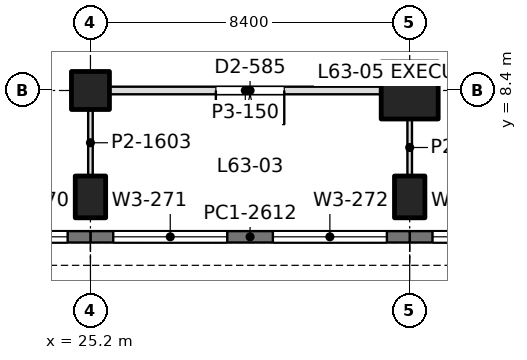
"""IFC4 building model, lengths in metres.
Left out: names, types, materials, properties, quantities, classifications, styles, units other than length and angle.
Written with IfcOpenShell. Run it as: python <this file> out.ifc"""

import sys

from ifc_helpers import new_model, si_unit, direction, frame, frame_2d, origin, origin_2d, place, context, subcontext, project, spatial, rectangle, extrude, element, fill, save


model = new_model("IFC4")
c1 = context("Model", 3, precision=1e-05, world=origin(), true_north=direction((0.0, 1.0)))
c2 = subcontext(c1, "Body", "Model", "MODEL_VIEW")
j1 = project(units=[si_unit("LENGTHUNIT", "METRE"), si_unit("PLANEANGLEUNIT", "RADIAN")], contexts=[c1])
p1 = place(None, origin())
s1 = spatial("IfcSite", under=j1, at=p1, CompositionType="ELEMENT")
p2 = place(p1, origin())
s2 = spatial("IfcBuilding", under=s1, at=p2, CompositionType="ELEMENT")
p3 = place(p2, frame((0.0, 0.0, 277.2)))
s3 = spatial("IfcBuildingStorey", under=s2, at=p3, CompositionType="ELEMENT", Elevation=277.2)
p4 = place(p3, frame((25.2, 5.6, 0.0), z_axis=(0.0, 0.0, 1.0), x_axis=(1.0, 0.0, 0.0)))
e1 = element("IfcColumn", 1, at=p4, inside=s3, PredefinedType="COLUMN", context=c2, shape_type="SweptSolid", body=[
    extrude(rectangle(XDim=0.8, YDim=1.1, at=origin_2d()), origin(), (0.0, 0.0, 1.0), 4.5),
])
p5 = place(p3, frame((25.2, 8.4, 0.0), z_axis=(0.0, 0.0, 1.0), x_axis=(1.0, 0.0, 0.0)))
e2 = element("IfcColumn", 2, at=p5, inside=s3, PredefinedType="COLUMN", context=c2, shape_type="SweptSolid", body=[
    extrude(rectangle(XDim=1.0, YDim=1.0, at=origin_2d()), origin(), (0.0, 0.0, 1.0), 4.5),
])
p6 = place(p3, frame((33.6, 5.6, 0.0), z_axis=(0.0, 0.0, 1.0), x_axis=(1.0, 0.0, 0.0)))
e3 = element("IfcColumn", 3, at=p6, inside=s3, PredefinedType="COLUMN", context=c2, shape_type="SweptSolid", body=[
    extrude(rectangle(XDim=0.8, YDim=1.1, at=origin_2d()), origin(), (0.0, 0.0, 1.0), 4.5),
])
p7 = place(p3, frame((33.6, 8.4, 0.0), z_axis=(0.0, 0.0, 1.0), x_axis=(1.0, 0.0, 0.0)))
e4 = element("IfcColumn", 4, at=p7, inside=s3, PredefinedType="COLUMN", context=c2, shape_type="SweptSolid", body=[
    extrude(rectangle(XDim=1.5, YDim=1.5, at=origin_2d()), origin(), (0.0, 0.0, 1.0), 4.5),
])
p8 = place(p3, frame((42.0, 4.55, 0.0), z_axis=(0.0, 0.0, 1.0), x_axis=(-1.0, 0.0, 0.0)))
e5 = element("IfcWall", 5, at=p8, inside=s3, PredefinedType="SOLIDWALL", context=c2, shape_type="SweptSolid", body=[
    extrude(rectangle(XDim=8.4, YDim=0.3, at=frame_2d((4.2, 0.0))), origin(), (0.0, 0.0, 1.0), 4.3),
])
p9 = place(p8, frame((0.6, 0.0, 0.9)))
e6 = element("IfcOpeningElement", 6, at=p9, cuts=e5, PredefinedType="OPENING", context=c2, shape_type="SweptSolid", body=[
    extrude(rectangle(XDim=3.0, YDim=2.4, at=frame_2d((1.5, 1.2))), frame((0.0, 0.16, 0.0), z_axis=(0.0, -1.0, 0.0), x_axis=(1.0, 0.0, 0.0)), (0.0, 0.0, 1.0), 0.32),
])
p10 = place(p8, frame((4.8, 0.0, 0.9)))
e7 = element("IfcOpeningElement", 7, at=p10, cuts=e5, PredefinedType="OPENING", context=c2, shape_type="SweptSolid", body=[
    extrude(rectangle(XDim=3.0, YDim=2.4, at=frame_2d((1.5, 1.2))), frame((0.0, 0.16, 0.0), z_axis=(0.0, -1.0, 0.0), x_axis=(1.0, 0.0, 0.0)), (0.0, 0.0, 1.0), 0.32),
])
p11 = place(p3, frame((33.6, 4.55, 0.0), z_axis=(0.0, 0.0, 1.0), x_axis=(-1.0, 0.0, 0.0)))
e8 = element("IfcWall", 8, at=p11, inside=s3, PredefinedType="SOLIDWALL", context=c2, shape_type="SweptSolid", body=[
    extrude(rectangle(XDim=8.4, YDim=0.3, at=frame_2d((4.2, 0.0))), origin(), (0.0, 0.0, 1.0), 4.3),
])
p12 = place(p11, frame((0.6, 0.0, 0.9)))
e9 = element("IfcOpeningElement", 9, at=p12, cuts=e8, PredefinedType="OPENING", context=c2, shape_type="SweptSolid", body=[
    extrude(rectangle(XDim=3.0, YDim=2.4, at=frame_2d((1.5, 1.2))), frame((0.0, 0.16, 0.0), z_axis=(0.0, -1.0, 0.0), x_axis=(1.0, 0.0, 0.0)), (0.0, 0.0, 1.0), 0.32),
])
p13 = place(p11, frame((4.8, 0.0, 0.9)))
e10 = element("IfcOpeningElement", 10, at=p13, cuts=e8, PredefinedType="OPENING", context=c2, shape_type="SweptSolid", body=[
    extrude(rectangle(XDim=3.0, YDim=2.4, at=frame_2d((1.5, 1.2))), frame((0.0, 0.16, 0.0), z_axis=(0.0, -1.0, 0.0), x_axis=(1.0, 0.0, 0.0)), (0.0, 0.0, 1.0), 0.32),
])
p14 = place(p3, frame((25.2, 4.55, 0.0), z_axis=(0.0, 0.0, 1.0), x_axis=(-1.0, 0.0, 0.0)))
e11 = element("IfcWall", 11, at=p14, inside=s3, PredefinedType="SOLIDWALL", context=c2, shape_type="SweptSolid", body=[
    extrude(rectangle(XDim=8.4, YDim=0.3, at=frame_2d((4.2, 0.0))), origin(), (0.0, 0.0, 1.0), 4.3),
])
p15 = place(p14, frame((0.6, 0.0, 0.9)))
e12 = element("IfcOpeningElement", 12, at=p15, cuts=e11, PredefinedType="OPENING", context=c2, shape_type="SweptSolid", body=[
    extrude(rectangle(XDim=3.0, YDim=2.4, at=frame_2d((1.5, 1.2))), frame((0.0, 0.16, 0.0), z_axis=(0.0, -1.0, 0.0), x_axis=(1.0, 0.0, 0.0)), (0.0, 0.0, 1.0), 0.32),
])
p16 = place(p14, frame((4.8, 0.0, 0.9)))
e13 = element("IfcOpeningElement", 13, at=p16, cuts=e11, PredefinedType="OPENING", context=c2, shape_type="SweptSolid", body=[
    extrude(rectangle(XDim=3.0, YDim=2.4, at=frame_2d((1.5, 1.2))), frame((0.0, 0.16, 0.0), z_axis=(0.0, -1.0, 0.0), x_axis=(1.0, 0.0, 0.0)), (0.0, 0.0, 1.0), 0.32),
])
p17 = place(p3, frame((25.699, 8.4, 0.0), z_axis=(0.0, 0.0, 1.0), x_axis=(1.0, 0.0, 0.0)))
e14 = element("IfcWall", 14, at=p17, inside=s3, PredefinedType="PARTITIONING", context=c2, shape_type="SweptSolid", body=[
    extrude(rectangle(XDim=7.152, YDim=0.2, at=frame_2d((3.576, 0.0))), origin(), (0.0, 0.0, 1.0), 3.292),
])
p18 = place(p17, frame((2.801, 0.0, 0.0)))
e15 = element("IfcOpeningElement", 15, at=p18, cuts=e14, PredefinedType="OPENING", context=c2, shape_type="SweptSolid", body=[
    extrude(rectangle(XDim=1.8, YDim=2.2, at=frame_2d((0.9, 1.1))), frame((0.0, 0.11, 0.0), z_axis=(0.0, -1.0, 0.0), x_axis=(1.0, 0.0, 0.0)), (0.0, 0.0, 1.0), 0.22),
])
p19 = place(p3, frame((25.2, 6.149, 0.0), z_axis=(0.0, 0.0, 1.0), x_axis=(0.0, 1.0, 0.0)))
e16 = element("IfcWall", 16, at=p19, inside=s3, PredefinedType="PARTITIONING", context=c2, shape_type="SweptSolid", body=[
    extrude(rectangle(XDim=1.752, YDim=0.12, at=frame_2d((0.876, 0.0))), origin(), (0.0, 0.0, 1.0), 3.292),
])
p20 = place(p3, frame((33.6, 6.149, 0.0), z_axis=(0.0, 0.0, 1.0), x_axis=(0.0, 1.0, 0.0)))
e17 = element("IfcWall", 17, at=p20, inside=s3, PredefinedType="PARTITIONING", context=c2, shape_type="SweptSolid", body=[
    extrude(rectangle(XDim=1.502, YDim=0.12, at=frame_2d((0.751, 0.0))), origin(), (0.0, 0.0, 1.0), 3.292),
])
p21 = place(p10, origin())
e18 = element("IfcWindow", 18, at=p21, inside=s3, PartitioningType="SINGLE_PANEL", PredefinedType="WINDOW", context=c2, shape_type="SweptSolid", body=[
    extrude(rectangle(XDim=3.0, YDim=2.4, at=frame_2d((1.5, 1.2))), frame((0.0, 0.03, 0.0), z_axis=(0.0, -1.0, 0.0), x_axis=(1.0, 0.0, 0.0)), (0.0, 0.0, 1.0), 0.06),
])
fill(e7, e18)
p22 = place(p12, origin())
e19 = element("IfcWindow", 19, at=p22, inside=s3, PartitioningType="SINGLE_PANEL", PredefinedType="WINDOW", context=c2, shape_type="SweptSolid", body=[
    extrude(rectangle(XDim=3.0, YDim=2.4, at=frame_2d((1.5, 1.2))), frame((0.0, 0.03, 0.0), z_axis=(0.0, -1.0, 0.0), x_axis=(1.0, 0.0, 0.0)), (0.0, 0.0, 1.0), 0.06),
])
fill(e9, e19)
p23 = place(p13, origin())
e20 = element("IfcWindow", 20, at=p23, inside=s3, PartitioningType="SINGLE_PANEL", PredefinedType="WINDOW", context=c2, shape_type="SweptSolid", body=[
    extrude(rectangle(XDim=3.0, YDim=2.4, at=frame_2d((1.5, 1.2))), frame((0.0, 0.03, 0.0), z_axis=(0.0, -1.0, 0.0), x_axis=(1.0, 0.0, 0.0)), (0.0, 0.0, 1.0), 0.06),
])
fill(e10, e20)
p24 = place(p15, origin())
e21 = element("IfcWindow", 21, at=p24, inside=s3, PartitioningType="SINGLE_PANEL", PredefinedType="WINDOW", context=c2, shape_type="SweptSolid", body=[
    extrude(rectangle(XDim=3.0, YDim=2.4, at=frame_2d((1.5, 1.2))), frame((0.0, 0.03, 0.0), z_axis=(0.0, -1.0, 0.0), x_axis=(1.0, 0.0, 0.0)), (0.0, 0.0, 1.0), 0.06),
])
fill(e12, e21)
p25 = place(p18, frame((1.8, 0.0, 0.0), z_axis=(0.0, 0.0, 1.0), x_axis=(-1.0, 0.0, 0.0)))
e22 = element("IfcDoor", 22, at=p25, inside=s3, OperationType="DOUBLE_DOOR_SINGLE_SWING", PredefinedType="DOOR", context=c2, shape_type="SweptSolid", body=[
    extrude(rectangle(XDim=1.8, YDim=2.2, at=frame_2d((0.9, 1.1))), frame((0.0, 0.025, 0.0), z_axis=(0.0, -1.0, 0.0), x_axis=(1.0, 0.0, 0.0)), (0.0, 0.0, 1.0), 0.05),
])
fill(e15, e22)
save(model, sys.argv[1])
